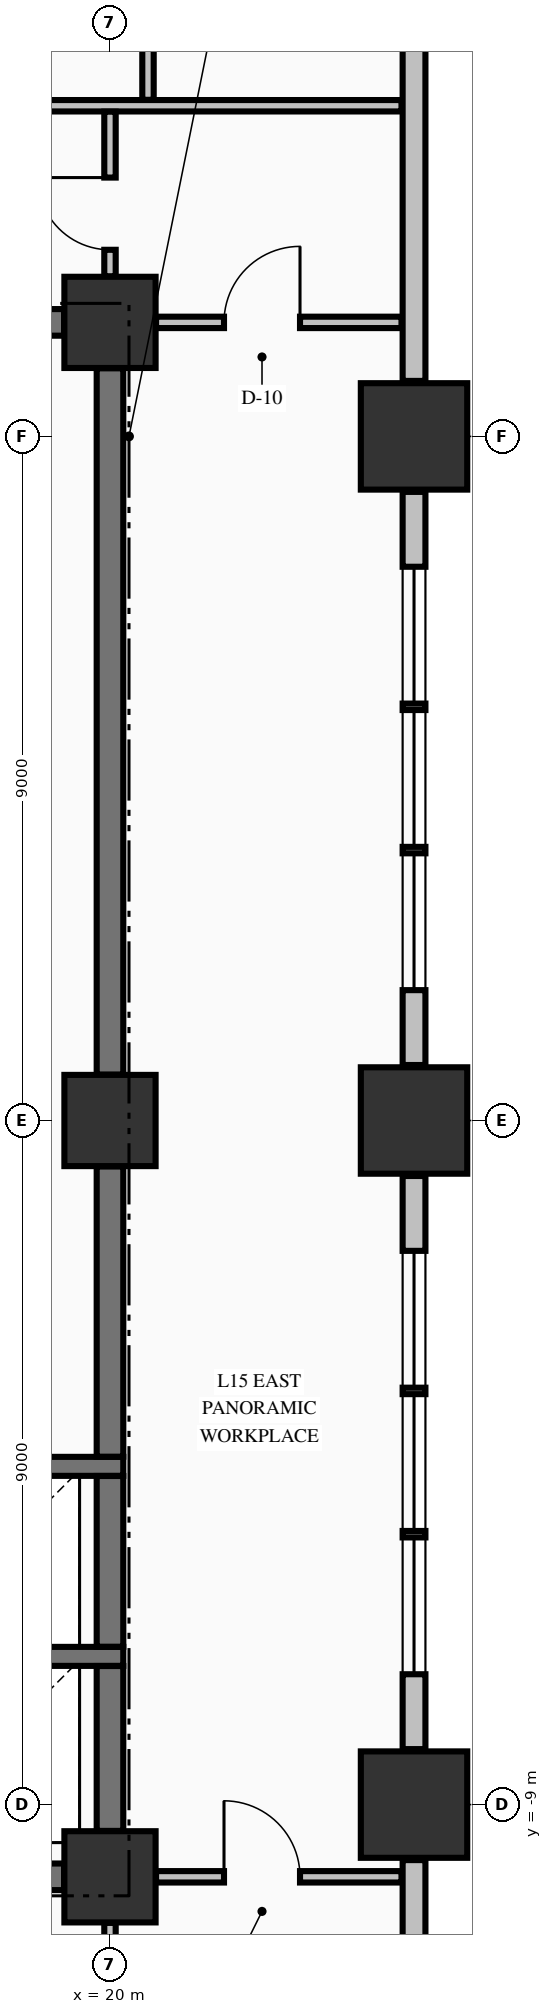
"""IFC4 building model, lengths in metres.
Left out: names, types, materials, properties, quantities, classifications, styles, units other than length and angle.
Written with IfcOpenShell. Run it as: python <this file> out.ifc"""

import sys

from ifc_helpers import new_model, si_unit, direction, frame, frame_2d, origin, origin_2d, place, context, subcontext, project, spatial, rectangle, extrude, element, fill, save


model = new_model("IFC4")
c1 = context("Model", 3, precision=1e-05, world=origin(), true_north=direction((0.0, 1.0)))
c2 = subcontext(c1, "Body", "Model", "MODEL_VIEW")
j1 = project(units=[si_unit("LENGTHUNIT", "METRE"), si_unit("PLANEANGLEUNIT", "RADIAN")], contexts=[c1])
p1 = place(None, origin())
s1 = spatial("IfcSite", under=j1, at=p1, CompositionType="ELEMENT")
p2 = place(p1, origin())
s2 = spatial("IfcBuilding", under=s1, at=p2, CompositionType="ELEMENT")
p3 = place(p2, frame((0.0, 0.0, 64.33)))
s3 = spatial("IfcBuildingStorey", under=s2, at=p3, CompositionType="ELEMENT", Elevation=64.33)
for number, where, z_axis, x_axis in (
    (1, (24.0, -9.0, -0.25), (0.0, 0.0, 1.0), (1.0, 0.0, 0.0)),
    (2, (24.0, 0.0, -0.25), (0.0, 0.0, 1.0), (1.0, 0.0, 0.0)),
    (3, (24.0, 9.0, -0.25), (0.0, 0.0, 1.0), (1.0, 0.0, 0.0)),
):
    element("IfcColumn", number, at=place(p3, frame(where, z_axis=z_axis, x_axis=x_axis)), inside=s3, PredefinedType="COLUMN", context=c2, shape_type="SweptSolid", body=[
        extrude(rectangle(XDim=1.4, YDim=1.4, at=origin_2d()), origin(), (0.0, 0.0, 1.0), 3.57),
    ])
for number, where, z_axis, x_axis in (
    (4, (20.0, -9.95, -0.25), (0.0, 0.0, 1.0), (1.0, 0.0, 0.0)),
    (5, (20.0, 10.5, -0.25), (0.0, 0.0, 1.0), (1.0, 0.0, 0.0)),
    (6, (20.0, 0.0, -0.25), (0.0, 0.0, 1.0), (1.0, 0.0, 0.0)),
):
    element("IfcColumn", number, at=place(p3, frame(where, z_axis=z_axis, x_axis=x_axis)), inside=s3, PredefinedType="COLUMN", context=c2, shape_type="SweptSolid", body=[
        extrude(rectangle(XDim=1.2, YDim=1.2, at=origin_2d()), origin(), (0.0, 0.0, 1.0), 3.57),
    ])
p4 = place(p3, frame((24.0, -22.27, 0.0), z_axis=(0.0, 0.0, 1.0), x_axis=(0.0, 1.0, 0.0)))
e7 = element("IfcWall", 7, at=p4, inside=s3, PredefinedType="STANDARD", context=c2, shape_type="SweptSolid", body=[
    extrude(rectangle(XDim=12.54, YDim=0.3, at=frame_2d((6.27, 0.0))), origin(), (0.0, 0.0, 1.0), 2.712),
])
p5 = place(p3, frame((24.0, -8.27, 0.0), z_axis=(0.0, 0.0, 1.0), x_axis=(0.0, 1.0, 0.0)))
e8 = element("IfcWall", 8, at=p5, inside=s3, PredefinedType="STANDARD", context=c2, shape_type="SweptSolid", body=[
    extrude(rectangle(XDim=7.54, YDim=0.3, at=frame_2d((3.77, 0.0))), origin(), (0.0, 0.0, 1.0), 2.712),
])
p6 = place(p5, frame((0.985, 0.0, 0.78)))
e9 = element("IfcOpeningElement", 9, at=p6, cuts=e8, PredefinedType="OPENING", context=c2, shape_type="SweptSolid", body=[
    extrude(rectangle(XDim=1.8, YDim=1.72, at=frame_2d((0.9, 0.86))), frame((0.0, 0.16, 0.0), z_axis=(0.0, -1.0, 0.0), x_axis=(1.0, 0.0, 0.0)), (0.0, 0.0, 1.0), 0.32),
])
p7 = place(p5, frame((2.87, 0.0, 0.78)))
e10 = element("IfcOpeningElement", 10, at=p7, cuts=e8, PredefinedType="OPENING", context=c2, shape_type="SweptSolid", body=[
    extrude(rectangle(XDim=1.8, YDim=1.72, at=frame_2d((0.9, 0.86))), frame((0.0, 0.16, 0.0), z_axis=(0.0, -1.0, 0.0), x_axis=(1.0, 0.0, 0.0)), (0.0, 0.0, 1.0), 0.32),
])
p8 = place(p5, frame((4.755, 0.0, 0.78)))
e11 = element("IfcOpeningElement", 11, at=p8, cuts=e8, PredefinedType="OPENING", context=c2, shape_type="SweptSolid", body=[
    extrude(rectangle(XDim=1.8, YDim=1.72, at=frame_2d((0.9, 0.86))), frame((0.0, 0.16, 0.0), z_axis=(0.0, -1.0, 0.0), x_axis=(1.0, 0.0, 0.0)), (0.0, 0.0, 1.0), 0.32),
])
p9 = place(p3, frame((24.0, 0.73, 0.0), z_axis=(0.0, 0.0, 1.0), x_axis=(0.0, 1.0, 0.0)))
e12 = element("IfcWall", 12, at=p9, inside=s3, PredefinedType="STANDARD", context=c2, shape_type="SweptSolid", body=[
    extrude(rectangle(XDim=7.54, YDim=0.3, at=frame_2d((3.77, 0.0))), origin(), (0.0, 0.0, 1.0), 2.712),
])
p10 = place(p9, frame((0.985, 0.0, 0.78)))
e13 = element("IfcOpeningElement", 13, at=p10, cuts=e12, PredefinedType="OPENING", context=c2, shape_type="SweptSolid", body=[
    extrude(rectangle(XDim=1.8, YDim=1.72, at=frame_2d((0.9, 0.86))), frame((0.0, 0.16, 0.0), z_axis=(0.0, -1.0, 0.0), x_axis=(1.0, 0.0, 0.0)), (0.0, 0.0, 1.0), 0.32),
])
p11 = place(p9, frame((2.87, 0.0, 0.78)))
e14 = element("IfcOpeningElement", 14, at=p11, cuts=e12, PredefinedType="OPENING", context=c2, shape_type="SweptSolid", body=[
    extrude(rectangle(XDim=1.8, YDim=1.72, at=frame_2d((0.9, 0.86))), frame((0.0, 0.16, 0.0), z_axis=(0.0, -1.0, 0.0), x_axis=(1.0, 0.0, 0.0)), (0.0, 0.0, 1.0), 0.32),
])
p12 = place(p9, frame((4.755, 0.0, 0.78)))
e15 = element("IfcOpeningElement", 15, at=p12, cuts=e12, PredefinedType="OPENING", context=c2, shape_type="SweptSolid", body=[
    extrude(rectangle(XDim=1.8, YDim=1.72, at=frame_2d((0.9, 0.86))), frame((0.0, 0.16, 0.0), z_axis=(0.0, -1.0, 0.0), x_axis=(1.0, 0.0, 0.0)), (0.0, 0.0, 1.0), 0.32),
])
p13 = place(p3, frame((24.0, 9.73, 0.0), z_axis=(0.0, 0.0, 1.0), x_axis=(0.0, 1.0, 0.0)))
e16 = element("IfcWall", 16, at=p13, inside=s3, PredefinedType="STANDARD", context=c2, shape_type="SweptSolid", body=[
    extrude(rectangle(XDim=12.54, YDim=0.3, at=frame_2d((6.27, 0.0))), origin(), (0.0, 0.0, 1.0), 2.712),
])
p14 = place(p3, frame((14.7, -9.95, 0.0), z_axis=(0.0, 0.0, 1.0), x_axis=(1.0, 0.0, 0.0)))
e17 = element("IfcWall", 17, at=p14, inside=s3, PredefinedType="SHEAR", context=c2, shape_type="SweptSolid", body=[
    extrude(rectangle(XDim=4.696, YDim=0.35, at=frame_2d((2.348, 0.0))), origin(), (0.0, 0.0, 1.0), 3.32),
])
p15 = place(p14, frame((0.8, 0.0, 0.0)))
e18 = element("IfcOpeningElement", 18, at=p15, cuts=e17, PredefinedType="OPENING", context=c2, shape_type="SweptSolid", body=[
    extrude(rectangle(XDim=0.9, YDim=2.15, at=frame_2d((0.45, 1.075))), frame((0.0, 0.185, 0.0), z_axis=(0.0, -1.0, 0.0), x_axis=(1.0, 0.0, 0.0)), (0.0, 0.0, 1.0), 0.37),
])
for number, where, z_axis, x_axis in (
    (19, (17.025, -7.05, 0.0), (0.0, 0.0, 1.0), (1.0, 0.0, 0.0)),
    (20, (17.025, -4.55, 0.0), (0.0, 0.0, 1.0), (1.0, 0.0, 0.0)),
):
    element("IfcWall", number, at=place(p3, frame(where, z_axis=z_axis, x_axis=x_axis)), inside=s3, PredefinedType="SOLIDWALL", context=c2, shape_type="SweptSolid", body=[
        extrude(rectangle(XDim=3.15, YDim=0.25, at=frame_2d((1.575, 0.0))), origin(), (0.0, 0.0, 1.0), 3.32),
    ])
p16 = place(p3, frame((14.7, 10.5, 0.0), z_axis=(0.0, 0.0, 1.0), x_axis=(1.0, 0.0, 0.0)))
e21 = element("IfcWall", 21, at=p16, inside=s3, PredefinedType="SHEAR", context=c2, shape_type="SweptSolid", body=[
    extrude(rectangle(XDim=4.696, YDim=0.35, at=frame_2d((2.348, 0.0))), origin(), (0.0, 0.0, 1.0), 3.32),
])
p17 = place(p16, frame((0.85, 0.0, 0.0)))
e22 = element("IfcOpeningElement", 22, at=p17, cuts=e21, PredefinedType="OPENING", context=c2, shape_type="SweptSolid", body=[
    extrude(rectangle(XDim=0.9, YDim=2.15, at=frame_2d((0.45, 1.075))), frame((0.0, 0.185, 0.0), z_axis=(0.0, -1.0, 0.0), x_axis=(1.0, 0.0, 0.0)), (0.0, 0.0, 1.0), 0.37),
])
p18 = place(p16, frame((3.4, 0.0, 0.0)))
e23 = element("IfcOpeningElement", 23, at=p18, cuts=e21, PredefinedType="OPENING", context=c2, shape_type="SweptSolid", body=[
    extrude(rectangle(XDim=0.9, YDim=2.15, at=frame_2d((0.45, 1.075))), frame((0.0, 0.185, 0.0), z_axis=(0.0, -1.0, 0.0), x_axis=(1.0, 0.0, 0.0)), (0.0, 0.0, 1.0), 0.37),
])
p19 = place(p3, frame((20.606, -9.95, 0.0), z_axis=(0.0, 0.0, 1.0), x_axis=(1.0, 0.0, 0.0)))
e24 = element("IfcWall", 24, at=p19, inside=s3, PredefinedType="PARTITIONING", context=c2, shape_type="SweptSolid", body=[
    extrude(rectangle(XDim=3.229, YDim=0.15, at=frame_2d((1.615, 0.0))), origin(), (0.0, 0.0, 1.0), 3.32),
])
p20 = place(p19, frame((0.894, 0.0, 0.0)))
e25 = element("IfcOpeningElement", 25, at=p20, cuts=e24, PredefinedType="OPENING", context=c2, shape_type="SweptSolid", body=[
    extrude(rectangle(XDim=1.0, YDim=2.15, at=frame_2d((0.5, 1.075))), frame((0.0, 0.085, 0.0), z_axis=(0.0, -1.0, 0.0), x_axis=(1.0, 0.0, 0.0)), (0.0, 0.0, 1.0), 0.17),
])
p21 = place(p3, frame((20.606, 10.5, 0.0), z_axis=(0.0, 0.0, 1.0), x_axis=(1.0, 0.0, 0.0)))
e26 = element("IfcWall", 26, at=p21, inside=s3, PredefinedType="PARTITIONING", context=c2, shape_type="SweptSolid", body=[
    extrude(rectangle(XDim=3.229, YDim=0.15, at=frame_2d((1.615, 0.0))), origin(), (0.0, 0.0, 1.0), 3.32),
])
p22 = place(p21, frame((0.894, 0.0, 0.0)))
e27 = element("IfcOpeningElement", 27, at=p22, cuts=e26, PredefinedType="OPENING", context=c2, shape_type="SweptSolid", body=[
    extrude(rectangle(XDim=1.0, YDim=2.15, at=frame_2d((0.5, 1.075))), frame((0.0, 0.085, 0.0), z_axis=(0.0, -1.0, 0.0), x_axis=(1.0, 0.0, 0.0)), (0.0, 0.0, 1.0), 0.17),
])
p23 = place(p3, frame((-28.835, 13.35, 0.0), z_axis=(0.0, 0.0, 1.0), x_axis=(1.0, 0.0, 0.0)))
e28 = element("IfcWall", 28, at=p23, inside=s3, PredefinedType="PARTITIONING", context=c2, shape_type="SweptSolid", body=[
    extrude(rectangle(XDim=52.67, YDim=0.15, at=frame_2d((26.335, 0.0))), origin(), (0.0, 0.0, 1.0), 3.32),
])
p24 = place(p23, frame((15.21, 0.0, 0.0)))
e29 = element("IfcOpeningElement", 29, at=p24, cuts=e28, PredefinedType="OPENING", context=c2, shape_type="SweptSolid", body=[
    extrude(rectangle(XDim=1.05, YDim=2.15, at=frame_2d((0.525, 1.075))), frame((0.0, 0.085, 0.0), z_axis=(0.0, -1.0, 0.0), x_axis=(1.0, 0.0, 0.0)), (0.0, 0.0, 1.0), 0.17),
])
p25 = place(p23, frame((31.26, 0.0, 0.0)))
e30 = element("IfcOpeningElement", 30, at=p25, cuts=e28, PredefinedType="OPENING", context=c2, shape_type="SweptSolid", body=[
    extrude(rectangle(XDim=1.05, YDim=2.15, at=frame_2d((0.525, 1.075))), frame((0.0, 0.085, 0.0), z_axis=(0.0, -1.0, 0.0), x_axis=(1.0, 0.0, 0.0)), (0.0, 0.0, 1.0), 0.17),
])
p26 = place(p23, frame((34.56, 0.0, 0.0)))
e31 = element("IfcOpeningElement", 31, at=p26, cuts=e28, PredefinedType="OPENING", context=c2, shape_type="SweptSolid", body=[
    extrude(rectangle(XDim=1.05, YDim=2.15, at=frame_2d((0.525, 1.075))), frame((0.0, 0.085, 0.0), z_axis=(0.0, -1.0, 0.0), x_axis=(1.0, 0.0, 0.0)), (0.0, 0.0, 1.0), 0.17),
])
p27 = place(p3, frame((20.0, -9.346, 0.0), z_axis=(0.0, 0.0, 1.0), x_axis=(0.0, 1.0, 0.0)))
e32 = element("IfcWall", 32, at=p27, inside=s3, PredefinedType="SHEAR", context=c2, shape_type="SweptSolid", body=[
    extrude(rectangle(XDim=2.169, YDim=0.35, at=frame_2d((1.084, 0.0))), origin(), (0.0, 0.0, 1.0), 3.32),
])
p28 = place(p3, frame((20.0, -6.923, 0.0), z_axis=(0.0, 0.0, 1.0), x_axis=(0.0, 1.0, 0.0)))
e33 = element("IfcWall", 33, at=p28, inside=s3, PredefinedType="SHEAR", context=c2, shape_type="SweptSolid", body=[
    extrude(rectangle(XDim=2.246, YDim=0.35, at=frame_2d((1.123, 0.0))), origin(), (0.0, 0.0, 1.0), 3.32),
])
p29 = place(p3, frame((20.0, -4.423, 0.0), z_axis=(0.0, 0.0, 1.0), x_axis=(0.0, 1.0, 0.0)))
e34 = element("IfcWall", 34, at=p29, inside=s3, PredefinedType="SHEAR", context=c2, shape_type="SweptSolid", body=[
    extrude(rectangle(XDim=3.819, YDim=0.35, at=frame_2d((1.91, 0.0))), origin(), (0.0, 0.0, 1.0), 3.32),
])
p30 = place(p3, frame((20.0, 0.604, 0.0), z_axis=(0.0, 0.0, 1.0), x_axis=(0.0, 1.0, 0.0)))
e35 = element("IfcWall", 35, at=p30, inside=s3, PredefinedType="SHEAR", context=c2, shape_type="SweptSolid", body=[
    extrude(rectangle(XDim=9.292, YDim=0.35, at=frame_2d((4.646, 0.0))), origin(), (0.0, 0.0, 1.0), 3.32),
])
p31 = place(p3, frame((20.0, -12.722, 0.0), z_axis=(0.0, 0.0, 1.0), x_axis=(0.0, 1.0, 0.0)))
e36 = element("IfcWall", 36, at=p31, inside=s3, PredefinedType="PARTITIONING", context=c2, shape_type="SweptSolid", body=[
    extrude(rectangle(XDim=2.166, YDim=0.15, at=frame_2d((1.083, 0.0))), origin(), (0.0, 0.0, 1.0), 3.32),
])
p32 = place(p31, frame((0.867, 0.0, 0.0)))
e37 = element("IfcOpeningElement", 37, at=p32, cuts=e36, PredefinedType="OPENING", context=c2, shape_type="SweptSolid", body=[
    extrude(rectangle(XDim=0.95, YDim=2.15, at=frame_2d((0.475, 1.075))), frame((0.0, 0.085, 0.0), z_axis=(0.0, -1.0, 0.0), x_axis=(1.0, 0.0, 0.0)), (0.0, 0.0, 1.0), 0.17),
])
p33 = place(p3, frame((20.0, 11.106, 0.0), z_axis=(0.0, 0.0, 1.0), x_axis=(0.0, 1.0, 0.0)))
e38 = element("IfcWall", 38, at=p33, inside=s3, PredefinedType="PARTITIONING", context=c2, shape_type="SweptSolid", body=[
    extrude(rectangle(XDim=2.166, YDim=0.15, at=frame_2d((1.083, 0.0))), origin(), (0.0, 0.0, 1.0), 3.32),
])
p34 = place(p33, frame((0.349, 0.0, 0.0)))
e39 = element("IfcOpeningElement", 39, at=p34, cuts=e38, PredefinedType="OPENING", context=c2, shape_type="SweptSolid", body=[
    extrude(rectangle(XDim=0.95, YDim=2.15, at=frame_2d((0.475, 1.075))), frame((0.0, 0.085, 0.0), z_axis=(0.0, -1.0, 0.0), x_axis=(1.0, 0.0, 0.0)), (0.0, 0.0, 1.0), 0.17),
])
p35 = place(p3, frame((20.5, 13.428, 0.0), z_axis=(0.0, 0.0, 1.0), x_axis=(0.0, 1.0, 0.0)))
e40 = element("IfcWall", 40, at=p35, inside=s3, PredefinedType="PARTITIONING", context=c2, shape_type="SweptSolid", body=[
    extrude(rectangle(XDim=8.866, YDim=0.15, at=frame_2d((4.433, 0.0))), origin(), (0.0, 0.0, 1.0), 3.32),
])
p36 = place(p6, origin())
e41 = element("IfcWindow", 41, at=p36, inside=s3, PartitioningType="SINGLE_PANEL", PredefinedType="WINDOW", context=c2, shape_type="SweptSolid", body=[
    extrude(rectangle(XDim=1.8, YDim=1.72, at=frame_2d((0.9, 0.86))), frame((0.0, 0.03, 0.0), z_axis=(0.0, -1.0, 0.0), x_axis=(1.0, 0.0, 0.0)), (0.0, 0.0, 1.0), 0.06),
])
fill(e9, e41)
p37 = place(p7, origin())
e42 = element("IfcWindow", 42, at=p37, inside=s3, PartitioningType="SINGLE_PANEL", PredefinedType="WINDOW", context=c2, shape_type="SweptSolid", body=[
    extrude(rectangle(XDim=1.8, YDim=1.72, at=frame_2d((0.9, 0.86))), frame((0.0, 0.03, 0.0), z_axis=(0.0, -1.0, 0.0), x_axis=(1.0, 0.0, 0.0)), (0.0, 0.0, 1.0), 0.06),
])
fill(e10, e42)
p38 = place(p8, origin())
e43 = element("IfcWindow", 43, at=p38, inside=s3, PartitioningType="SINGLE_PANEL", PredefinedType="WINDOW", context=c2, shape_type="SweptSolid", body=[
    extrude(rectangle(XDim=1.8, YDim=1.72, at=frame_2d((0.9, 0.86))), frame((0.0, 0.03, 0.0), z_axis=(0.0, -1.0, 0.0), x_axis=(1.0, 0.0, 0.0)), (0.0, 0.0, 1.0), 0.06),
])
fill(e11, e43)
p39 = place(p10, origin())
e44 = element("IfcWindow", 44, at=p39, inside=s3, PartitioningType="SINGLE_PANEL", PredefinedType="WINDOW", context=c2, shape_type="SweptSolid", body=[
    extrude(rectangle(XDim=1.8, YDim=1.72, at=frame_2d((0.9, 0.86))), frame((0.0, 0.03, 0.0), z_axis=(0.0, -1.0, 0.0), x_axis=(1.0, 0.0, 0.0)), (0.0, 0.0, 1.0), 0.06),
])
fill(e13, e44)
p40 = place(p11, origin())
e45 = element("IfcWindow", 45, at=p40, inside=s3, PartitioningType="SINGLE_PANEL", PredefinedType="WINDOW", context=c2, shape_type="SweptSolid", body=[
    extrude(rectangle(XDim=1.8, YDim=1.72, at=frame_2d((0.9, 0.86))), frame((0.0, 0.03, 0.0), z_axis=(0.0, -1.0, 0.0), x_axis=(1.0, 0.0, 0.0)), (0.0, 0.0, 1.0), 0.06),
])
fill(e14, e45)
p41 = place(p12, origin())
e46 = element("IfcWindow", 46, at=p41, inside=s3, PartitioningType="SINGLE_PANEL", PredefinedType="WINDOW", context=c2, shape_type="SweptSolid", body=[
    extrude(rectangle(XDim=1.8, YDim=1.72, at=frame_2d((0.9, 0.86))), frame((0.0, 0.03, 0.0), z_axis=(0.0, -1.0, 0.0), x_axis=(1.0, 0.0, 0.0)), (0.0, 0.0, 1.0), 0.06),
])
fill(e15, e46)
p42 = place(p34, origin())
e47 = element("IfcDoor", 47, at=p42, inside=s3, OperationType="SINGLE_SWING_RIGHT", PredefinedType="DOOR", context=c2, shape_type="SweptSolid", body=[
    extrude(rectangle(XDim=0.95, YDim=2.15, at=frame_2d((0.475, 1.075))), frame((0.0, 0.025, 0.0), z_axis=(0.0, -1.0, 0.0), x_axis=(1.0, 0.0, 0.0)), (0.0, 0.0, 1.0), 0.05),
])
fill(e39, e47)
p43 = place(p22, origin())
e48 = element("IfcDoor", 48, at=p43, inside=s3, OperationType="SINGLE_SWING_RIGHT", PredefinedType="DOOR", context=c2, shape_type="SweptSolid", body=[
    extrude(rectangle(XDim=1.0, YDim=2.15, at=frame_2d((0.5, 1.075))), frame((0.0, 0.025, 0.0), z_axis=(0.0, -1.0, 0.0), x_axis=(1.0, 0.0, 0.0)), (0.0, 0.0, 1.0), 0.05),
])
fill(e27, e48)
p44 = place(p20, origin())
e49 = element("IfcDoor", 49, at=p44, inside=s3, OperationType="SINGLE_SWING_LEFT", PredefinedType="DOOR", context=c2, shape_type="SweptSolid", body=[
    extrude(rectangle(XDim=1.0, YDim=2.15, at=frame_2d((0.5, 1.075))), frame((0.0, 0.025, 0.0), z_axis=(0.0, -1.0, 0.0), x_axis=(1.0, 0.0, 0.0)), (0.0, 0.0, 1.0), 0.05),
])
fill(e25, e49)
save(model, sys.argv[1])
